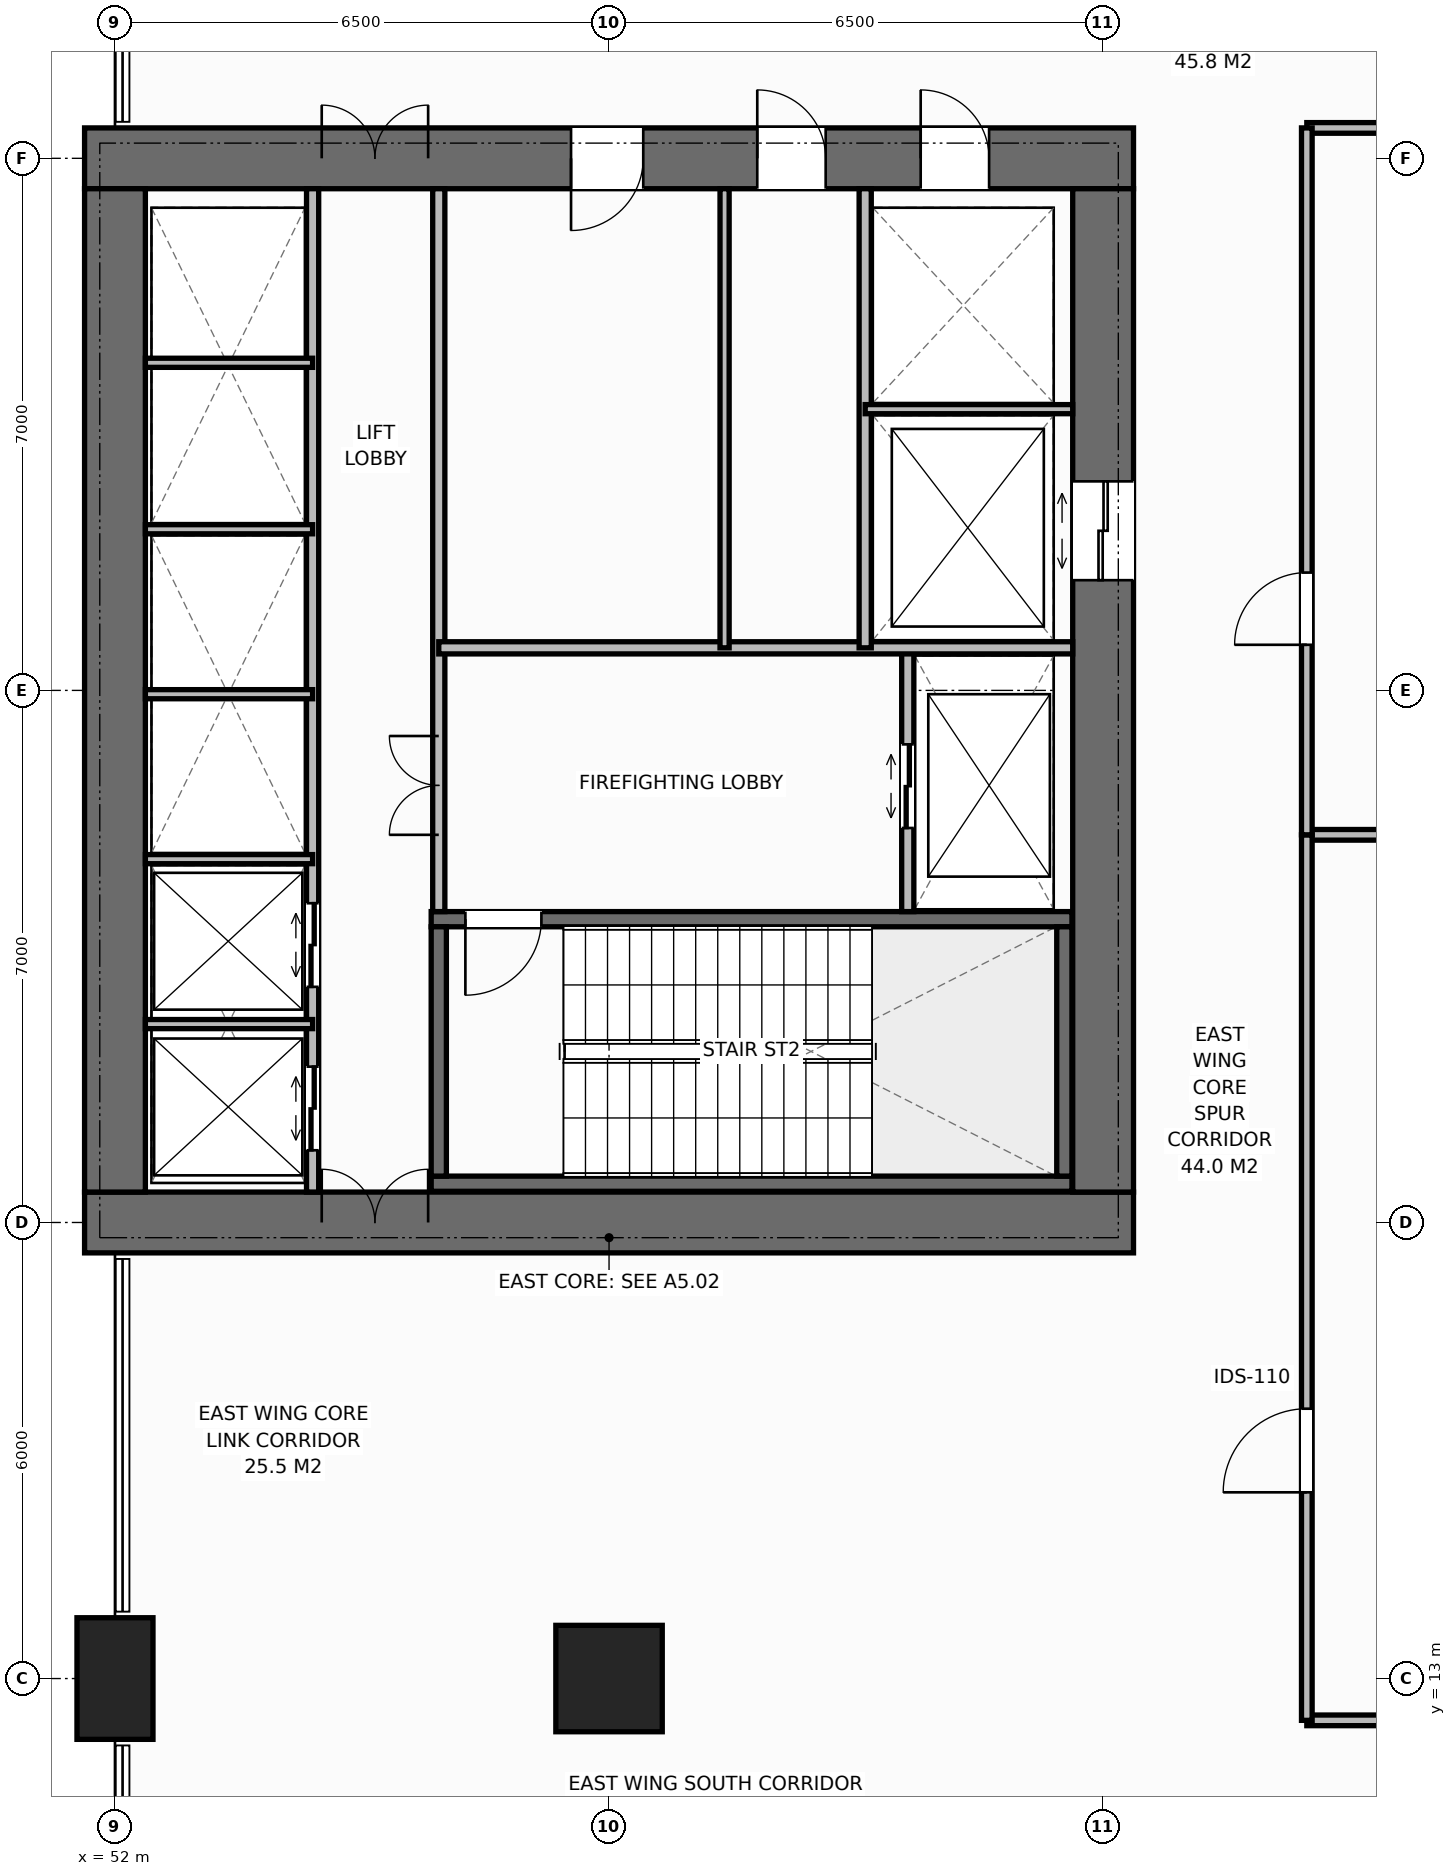
"""IFC4 building model, lengths in metres.
Left out: names, types, materials, properties, quantities, classifications, styles, units other than length and angle.
Written with IfcOpenShell. Run it as: python <this file> out.ifc"""

import sys

from ifc_helpers import new_model, si_unit, direction, frame, frame_2d, origin, origin_2d, place, context, subcontext, project, spatial, rectangle, extrude, element, fill, save


model = new_model("IFC4")
c1 = context("Model", 3, precision=1e-05, world=origin(), true_north=direction((0.0, 1.0)))
c2 = subcontext(c1, "Body", "Model", "MODEL_VIEW")
j1 = project(units=[si_unit("LENGTHUNIT", "METRE"), si_unit("PLANEANGLEUNIT", "RADIAN")], contexts=[c1])
p1 = place(None, origin())
s1 = spatial("IfcSite", under=j1, at=p1, CompositionType="ELEMENT")
p2 = place(p1, origin())
s2 = spatial("IfcBuilding", under=s1, at=p2, CompositionType="ELEMENT")
p3 = place(p2, frame((0.0, 0.0, 17.0)))
s3 = spatial("IfcBuildingStorey", under=s2, at=p3, CompositionType="ELEMENT", Elevation=17.0)
p4 = place(p3, frame((51.6, 19.0, 0.0), z_axis=(0.0, 0.0, 1.0), x_axis=(1.0, 0.0, 0.0)))
e1 = element("IfcWall", 1, at=p4, inside=s3, PredefinedType="SHEAR", context=c2, shape_type="SweptSolid", body=[
    extrude(rectangle(XDim=13.8, YDim=0.8, at=frame_2d((6.9, 0.0))), origin(), (0.0, 0.0, 1.0), 5.0),
])
p5 = place(p4, frame((3.12, 0.0, 0.0)))
e2 = element("IfcOpeningElement", 2, at=p5, cuts=e1, PredefinedType="OPENING", context=c2, shape_type="SweptSolid", body=[
    extrude(rectangle(XDim=1.4, YDim=2.2, at=frame_2d((0.7, 1.1))), frame((0.0, 0.41, 0.0), z_axis=(0.0, -1.0, 0.0), x_axis=(1.0, 0.0, 0.0)), (0.0, 0.0, 1.0), 0.82),
])
p6 = place(p3, frame((51.6, 33.0, 0.0), z_axis=(0.0, 0.0, 1.0), x_axis=(1.0, 0.0, 0.0)))
e3 = element("IfcWall", 3, at=p6, inside=s3, PredefinedType="SHEAR", context=c2, shape_type="SweptSolid", body=[
    extrude(rectangle(XDim=13.8, YDim=0.8, at=frame_2d((6.9, 0.0))), origin(), (0.0, 0.0, 1.0), 5.0),
])
p7 = place(p6, frame((3.12, 0.0, 0.0)))
e4 = element("IfcOpeningElement", 4, at=p7, cuts=e3, PredefinedType="OPENING", context=c2, shape_type="SweptSolid", body=[
    extrude(rectangle(XDim=1.4, YDim=2.2, at=frame_2d((0.7, 1.1))), frame((0.0, 0.41, 0.0), z_axis=(0.0, -1.0, 0.0), x_axis=(1.0, 0.0, 0.0)), (0.0, 0.0, 1.0), 0.82),
])
p8 = place(p6, frame((11.0, 0.0, 0.0)))
e5 = element("IfcOpeningElement", 5, at=p8, cuts=e3, PredefinedType="OPENING", context=c2, shape_type="SweptSolid", body=[
    extrude(rectangle(XDim=0.9, YDim=2.15, at=frame_2d((0.45, 1.075))), frame((0.0, 0.41, 0.0), z_axis=(0.0, -1.0, 0.0), x_axis=(1.0, 0.0, 0.0)), (0.0, 0.0, 1.0), 0.82),
])
p9 = place(p6, frame((6.4, 0.0, 0.0)))
e6 = element("IfcOpeningElement", 6, at=p9, cuts=e3, PredefinedType="OPENING", context=c2, shape_type="SweptSolid", body=[
    extrude(rectangle(XDim=0.95, YDim=2.15, at=frame_2d((0.475, 1.075))), frame((0.0, 0.41, 0.0), z_axis=(0.0, -1.0, 0.0), x_axis=(1.0, 0.0, 0.0)), (0.0, 0.0, 1.0), 0.82),
])
p10 = place(p6, frame((8.85, 0.0, 0.0)))
e7 = element("IfcOpeningElement", 7, at=p10, cuts=e3, PredefinedType="OPENING", context=c2, shape_type="SweptSolid", body=[
    extrude(rectangle(XDim=0.9, YDim=2.15, at=frame_2d((0.45, 1.075))), frame((0.0, 0.41, 0.0), z_axis=(0.0, -1.0, 0.0), x_axis=(1.0, 0.0, 0.0)), (0.0, 0.0, 1.0), 0.82),
])
p11 = place(p3, frame((52.0, 19.4, 0.0), z_axis=(0.0, 0.0, 1.0), x_axis=(0.0, 1.0, 0.0)))
e8 = element("IfcWall", 8, at=p11, inside=s3, PredefinedType="SHEAR", context=c2, shape_type="SweptSolid", body=[
    extrude(rectangle(XDim=13.2, YDim=0.8, at=frame_2d((6.6, 0.0))), origin(), (0.0, 0.0, 1.0), 5.0),
])
p12 = place(p3, frame((65.0, 19.4, 0.0), z_axis=(0.0, 0.0, 1.0), x_axis=(0.0, 1.0, 0.0)))
e9 = element("IfcWall", 9, at=p12, inside=s3, PredefinedType="SHEAR", context=c2, shape_type="SweptSolid", body=[
    extrude(rectangle(XDim=13.2, YDim=0.8, at=frame_2d((6.6, 0.0))), origin(), (0.0, 0.0, 1.0), 5.0),
])
p13 = place(p12, frame((8.05, 0.0, 0.0)))
e10 = element("IfcOpeningElement", 10, at=p13, cuts=e9, PredefinedType="OPENING", context=c2, shape_type="SweptSolid", body=[
    extrude(rectangle(XDim=1.3, YDim=2.2, at=frame_2d((0.65, 1.1))), frame((0.0, 0.41, 0.0), z_axis=(0.0, -1.0, 0.0), x_axis=(1.0, 0.0, 0.0)), (0.0, 0.0, 1.0), 0.82),
])
p14 = place(p3, frame((56.16, 19.51, 0.0), z_axis=(0.0, 0.0, 1.0), x_axis=(1.0, 0.0, 0.0)))
e11 = element("IfcWall", 11, at=p14, inside=s3, PredefinedType="SHEAR", context=c2, shape_type="SweptSolid", body=[
    extrude(rectangle(XDim=8.43, YDim=0.2, at=frame_2d((4.215, 0.0))), origin(), (0.0, 0.0, 1.0), 5.0),
])
p15 = place(p3, frame((56.16, 22.99, 0.0), z_axis=(0.0, 0.0, 1.0), x_axis=(1.0, 0.0, 0.0)))
e12 = element("IfcWall", 12, at=p15, inside=s3, PredefinedType="SHEAR", context=c2, shape_type="SweptSolid", body=[
    extrude(rectangle(XDim=8.43, YDim=0.2, at=frame_2d((4.215, 0.0))), origin(), (0.0, 0.0, 1.0), 5.0),
])
p16 = place(p15, frame((0.45, 0.0, 0.0)))
e13 = element("IfcOpeningElement", 13, at=p16, cuts=e12, PredefinedType="OPENING", context=c2, shape_type="SweptSolid", body=[
    extrude(rectangle(XDim=1.0, YDim=2.15, at=frame_2d((0.5, 1.075))), frame((0.0, 0.11, 0.0), z_axis=(0.0, -1.0, 0.0), x_axis=(1.0, 0.0, 0.0)), (0.0, 0.0, 1.0), 0.22),
])
for number, where, z_axis, x_axis in (
    (14, (56.26, 19.61, 0.0), (0.0, 0.0, 1.0), (0.0, 1.0, 0.0)),
    (15, (64.49, 19.61, 0.0), (0.0, 0.0, 1.0), (0.0, 1.0, 0.0)),
):
    element("IfcWall", number, at=place(p3, frame(where, z_axis=z_axis, x_axis=x_axis)), inside=s3, PredefinedType="SHEAR", context=c2, shape_type="SweptSolid", body=[
        extrude(rectangle(XDim=3.28, YDim=0.2, at=frame_2d((1.64, 0.0))), origin(), (0.0, 0.0, 1.0), 5.0),
    ])
p17 = place(p3, frame((58.5, 13.0, 0.0), z_axis=(0.0, 0.0, 1.0), x_axis=(1.0, 0.0, 0.0)))
e16 = element("IfcColumn", 16, at=p17, inside=s3, PredefinedType="COLUMN", context=c2, shape_type="SweptSolid", body=[
    extrude(rectangle(XDim=1.4, YDim=1.4, at=origin_2d()), origin(), (0.0, 0.0, 1.0), 5.0),
])
p18 = place(p3, frame((52.0, 13.0, 0.0), z_axis=(0.0, 0.0, 1.0), x_axis=(1.0, 0.0, 0.0)))
e17 = element("IfcColumn", 17, at=p18, inside=s3, PredefinedType="PILASTER", context=c2, shape_type="SweptSolid", body=[
    extrude(rectangle(XDim=1.0, YDim=1.6, at=origin_2d()), origin(), (0.0, 0.0, 1.0), 5.0),
])
p19 = place(p3, frame((54.6, 19.4, 0.0), z_axis=(0.0, 0.0, 1.0), x_axis=(0.0, 1.0, 0.0)))
e18 = element("IfcWall", 18, at=p19, inside=s3, PredefinedType="STANDARD", context=c2, shape_type="SweptSolid", body=[
    extrude(rectangle(XDim=13.2, YDim=0.16, at=frame_2d((6.6, 0.0))), origin(), (0.0, 0.0, 1.0), 4.4),
])
p20 = place(p19, frame((0.55, 0.0, 0.0)))
e19 = element("IfcOpeningElement", 19, at=p20, cuts=e18, PredefinedType="OPENING", context=c2, shape_type="SweptSolid", body=[
    extrude(rectangle(XDim=1.1, YDim=2.2, at=frame_2d((0.55, 1.1))), frame((0.0, 0.09, 0.0), z_axis=(0.0, -1.0, 0.0), x_axis=(1.0, 0.0, 0.0)), (0.0, 0.0, 1.0), 0.18),
])
p21 = place(p19, frame((2.7, 0.0, 0.0)))
e20 = element("IfcOpeningElement", 20, at=p21, cuts=e18, PredefinedType="OPENING", context=c2, shape_type="SweptSolid", body=[
    extrude(rectangle(XDim=1.1, YDim=2.2, at=frame_2d((0.55, 1.1))), frame((0.0, 0.09, 0.0), z_axis=(0.0, -1.0, 0.0), x_axis=(1.0, 0.0, 0.0)), (0.0, 0.0, 1.0), 0.18),
])
p22 = place(p3, frame((56.26, 23.09, 0.0), z_axis=(0.0, 0.0, 1.0), x_axis=(0.0, 1.0, 0.0)))
e21 = element("IfcWall", 21, at=p22, inside=s3, PredefinedType="STANDARD", context=c2, shape_type="SweptSolid", body=[
    extrude(rectangle(XDim=9.51, YDim=0.16, at=frame_2d((4.755, 0.0))), origin(), (0.0, 0.0, 1.0), 4.4),
])
p23 = place(p22, frame((1.01, 0.0, 0.0)))
e22 = element("IfcOpeningElement", 22, at=p23, cuts=e21, PredefinedType="OPENING", context=c2, shape_type="SweptSolid", body=[
    extrude(rectangle(XDim=1.3, YDim=2.2, at=frame_2d((0.65, 1.1))), frame((0.0, 0.09, 0.0), z_axis=(0.0, -1.0, 0.0), x_axis=(1.0, 0.0, 0.0)), (0.0, 0.0, 1.0), 0.18),
])
for number, where, z_axis, x_axis in (
    (23, (52.4, 21.61, 0.0), (0.0, 0.0, 1.0), (1.0, 0.0, 0.0)),
    (24, (52.4, 23.78, 0.0), (0.0, 0.0, 1.0), (1.0, 0.0, 0.0)),
    (25, (52.4, 25.95, 0.0), (0.0, 0.0, 1.0), (1.0, 0.0, 0.0)),
    (26, (52.4, 28.12, 0.0), (0.0, 0.0, 1.0), (1.0, 0.0, 0.0)),
    (27, (52.4, 30.31, 0.0), (0.0, 0.0, 1.0), (1.0, 0.0, 0.0)),
):
    element("IfcWall", number, at=place(p3, frame(where, z_axis=z_axis, x_axis=x_axis)), inside=s3, PredefinedType="PARTITIONING", context=c2, shape_type="SweptSolid", body=[
        extrude(rectangle(XDim=2.2, YDim=0.12, at=frame_2d((1.1, 0.0))), origin(), (0.0, 0.0, 1.0), 4.4),
    ])
p24 = place(p3, frame((62.43, 23.09, 0.0), z_axis=(0.0, 0.0, 1.0), x_axis=(0.0, 1.0, 0.0)))
e28 = element("IfcWall", 28, at=p24, inside=s3, PredefinedType="STANDARD", context=c2, shape_type="SweptSolid", body=[
    extrude(rectangle(XDim=3.47, YDim=0.16, at=frame_2d((1.735, 0.0))), origin(), (0.0, 0.0, 1.0), 4.4),
])
p25 = place(p24, frame((1.1, 0.0, 0.0)))
e29 = element("IfcOpeningElement", 29, at=p25, cuts=e28, PredefinedType="OPENING", context=c2, shape_type="SweptSolid", body=[
    extrude(rectangle(XDim=1.1, YDim=2.2, at=frame_2d((0.55, 1.1))), frame((0.0, 0.09, 0.0), z_axis=(0.0, -1.0, 0.0), x_axis=(1.0, 0.0, 0.0)), (0.0, 0.0, 1.0), 0.18),
])
p26 = place(p3, frame((56.26, 26.56, 0.0), z_axis=(0.0, 0.0, 1.0), x_axis=(1.0, 0.0, 0.0)))
e30 = element("IfcWall", 30, at=p26, inside=s3, PredefinedType="STANDARD", context=c2, shape_type="SweptSolid", body=[
    extrude(rectangle(XDim=8.34, YDim=0.16, at=frame_2d((4.17, 0.0))), origin(), (0.0, 0.0, 1.0), 4.4),
])
p27 = place(p3, frame((61.87, 26.56, 0.0), z_axis=(0.0, 0.0, 1.0), x_axis=(0.0, 1.0, 0.0)))
e31 = element("IfcWall", 31, at=p27, inside=s3, PredefinedType="STANDARD", context=c2, shape_type="SweptSolid", body=[
    extrude(rectangle(XDim=6.04, YDim=0.16, at=frame_2d((3.02, 0.0))), origin(), (0.0, 0.0, 1.0), 4.4),
])
p28 = place(p3, frame((61.87, 29.7, 0.0), z_axis=(0.0, 0.0, 1.0), x_axis=(1.0, 0.0, 0.0)))
e32 = element("IfcWall", 32, at=p28, inside=s3, PredefinedType="PARTITIONING", context=c2, shape_type="SweptSolid", body=[
    extrude(rectangle(XDim=2.73, YDim=0.12, at=frame_2d((1.365, 0.0))), origin(), (0.0, 0.0, 1.0), 4.4),
])
p29 = place(p3, frame((60.02, 26.56, 0.0), z_axis=(0.0, 0.0, 1.0), x_axis=(0.0, 1.0, 0.0)))
e33 = element("IfcWall", 33, at=p29, inside=s3, PredefinedType="PARTITIONING", context=c2, shape_type="SweptSolid", body=[
    extrude(rectangle(XDim=6.04, YDim=0.12, at=frame_2d((3.02, 0.0))), origin(), (0.0, 0.0, 1.0), 4.4),
])
for number, where, z_axis, x_axis in (
    (34, (67.68, 24.1, 0.0), (0.0, 0.0, 1.0), (1.0, 0.0, 0.0)),
    (35, (67.68, 33.4, 0.0), (0.0, 0.0, 1.0), (1.0, 0.0, 0.0)),
):
    element("IfcWall", number, at=place(p3, frame(where, z_axis=z_axis, x_axis=x_axis)), inside=s3, PredefinedType="PARTITIONING", context=c2, shape_type="SweptSolid", body=[
        extrude(rectangle(XDim=10.32, YDim=0.14, at=frame_2d((5.16, 0.0))), origin(), (0.0, 0.0, 1.0), 4.4),
    ])
p30 = place(p3, frame((67.68, 12.45, 0.0), z_axis=(0.0, 0.0, 1.0), x_axis=(1.0, 0.0, 0.0)))
e36 = element("IfcWall", 36, at=p30, inside=s3, PredefinedType="PARTITIONING", context=c2, shape_type="SweptSolid", body=[
    extrude(rectangle(XDim=6.27, YDim=0.14, at=frame_2d((3.135, 0.0))), origin(), (0.0, 0.0, 1.0), 4.4),
])
p31 = place(p3, frame((67.68, 12.45, 0.0), z_axis=(0.0, 0.0, 1.0), x_axis=(0.0, 1.0, 0.0)))
e37 = element("IfcWall", 37, at=p31, inside=s3, PredefinedType="PARTITIONING", context=c2, shape_type="SweptSolid", body=[
    extrude(rectangle(XDim=11.65, YDim=0.14, at=frame_2d((5.825, 0.0))), origin(), (0.0, 0.0, 1.0), 4.4),
])
p32 = place(p31, frame((3.0, 0.0, 0.0)))
e38 = element("IfcOpeningElement", 38, at=p32, cuts=e37, PredefinedType="OPENING", context=c2, shape_type="SweptSolid", body=[
    extrude(rectangle(XDim=1.1, YDim=2.15, at=frame_2d((0.55, 1.075))), frame((0.0, 0.08, 0.0), z_axis=(0.0, -1.0, 0.0), x_axis=(1.0, 0.0, 0.0)), (0.0, 0.0, 1.0), 0.16),
])
p33 = place(p3, frame((67.68, 24.1, 0.0), z_axis=(0.0, 0.0, 1.0), x_axis=(0.0, 1.0, 0.0)))
e39 = element("IfcWall", 39, at=p33, inside=s3, PredefinedType="PARTITIONING", context=c2, shape_type="SweptSolid", body=[
    extrude(rectangle(XDim=9.3, YDim=0.14, at=frame_2d((4.65, 0.0))), origin(), (0.0, 0.0, 1.0), 4.4),
])
p34 = place(p33, frame((2.5, 0.0, 0.0)))
e40 = element("IfcOpeningElement", 40, at=p34, cuts=e39, PredefinedType="OPENING", context=c2, shape_type="SweptSolid", body=[
    extrude(rectangle(XDim=0.95, YDim=2.15, at=frame_2d((0.475, 1.075))), frame((0.0, 0.08, 0.0), z_axis=(0.0, -1.0, 0.0), x_axis=(1.0, 0.0, 0.0)), (0.0, 0.0, 1.0), 0.16),
])
p35 = place(p5, origin())
e41 = element("IfcDoor", 41, at=p35, inside=s3, OperationType="DOUBLE_DOOR_SINGLE_SWING", PredefinedType="DOOR", context=c2, shape_type="SweptSolid", body=[
    extrude(rectangle(XDim=1.4, YDim=2.2, at=frame_2d((0.7, 1.1))), frame((0.0, 0.125, 0.0), z_axis=(0.0, -1.0, 0.0), x_axis=(1.0, 0.0, 0.0)), (0.0, 0.0, 1.0), 0.05),
])
fill(e2, e41)
p36 = place(p7, origin())
e42 = element("IfcDoor", 42, at=p36, inside=s3, OperationType="DOUBLE_DOOR_SINGLE_SWING", PredefinedType="DOOR", context=c2, shape_type="SweptSolid", body=[
    extrude(rectangle(XDim=1.4, YDim=2.2, at=frame_2d((0.7, 1.1))), frame((0.0, -0.075, 0.0), z_axis=(0.0, -1.0, 0.0), x_axis=(1.0, 0.0, 0.0)), (0.0, 0.0, 1.0), 0.05),
])
fill(e4, e42)
p37 = place(p20, origin())
e43 = element("IfcDoor", 43, at=p37, inside=s3, OperationType="DOUBLE_DOOR_SLIDING", PredefinedType="DOOR", context=c2, shape_type="SweptSolid", body=[
    extrude(rectangle(XDim=1.1, YDim=2.2, at=frame_2d((0.55, 1.1))), frame((0.0, 0.025, 0.0), z_axis=(0.0, -1.0, 0.0), x_axis=(1.0, 0.0, 0.0)), (0.0, 0.0, 1.0), 0.05),
])
fill(e19, e43)
p38 = place(p21, origin())
e44 = element("IfcDoor", 44, at=p38, inside=s3, OperationType="DOUBLE_DOOR_SLIDING", PredefinedType="DOOR", context=c2, shape_type="SweptSolid", body=[
    extrude(rectangle(XDim=1.1, YDim=2.2, at=frame_2d((0.55, 1.1))), frame((0.0, 0.025, 0.0), z_axis=(0.0, -1.0, 0.0), x_axis=(1.0, 0.0, 0.0)), (0.0, 0.0, 1.0), 0.05),
])
fill(e20, e44)
p39 = place(p16, origin())
e45 = element("IfcDoor", 45, at=p39, inside=s3, OperationType="SINGLE_SWING_RIGHT", PredefinedType="DOOR", context=c2, shape_type="SweptSolid", body=[
    extrude(rectangle(XDim=1.0, YDim=2.15, at=frame_2d((0.5, 1.075))), frame((0.0, 0.025, 0.0), z_axis=(0.0, -1.0, 0.0), x_axis=(1.0, 0.0, 0.0)), (0.0, 0.0, 1.0), 0.05),
])
fill(e13, e45)
p40 = place(p25, origin())
e46 = element("IfcDoor", 46, at=p40, inside=s3, OperationType="DOUBLE_DOOR_SLIDING", PredefinedType="DOOR", context=c2, shape_type="SweptSolid", body=[
    extrude(rectangle(XDim=1.1, YDim=2.2, at=frame_2d((0.55, 1.1))), frame((0.0, 0.025, 0.0), z_axis=(0.0, -1.0, 0.0), x_axis=(1.0, 0.0, 0.0)), (0.0, 0.0, 1.0), 0.05),
])
fill(e29, e46)
p41 = place(p23, origin())
e47 = element("IfcDoor", 47, at=p41, inside=s3, OperationType="DOUBLE_DOOR_SINGLE_SWING", PredefinedType="DOOR", context=c2, shape_type="SweptSolid", body=[
    extrude(rectangle(XDim=1.3, YDim=2.2, at=frame_2d((0.65, 1.1))), frame((0.0, 0.025, 0.0), z_axis=(0.0, -1.0, 0.0), x_axis=(1.0, 0.0, 0.0)), (0.0, 0.0, 1.0), 0.05),
])
fill(e22, e47)
p42 = place(p13, origin())
e48 = element("IfcDoor", 48, at=p42, inside=s3, OperationType="DOUBLE_DOOR_SLIDING", PredefinedType="DOOR", context=c2, shape_type="SweptSolid", body=[
    extrude(rectangle(XDim=1.3, YDim=2.2, at=frame_2d((0.65, 1.1))), frame((0.0, 0.025, 0.0), z_axis=(0.0, -1.0, 0.0), x_axis=(1.0, 0.0, 0.0)), (0.0, 0.0, 1.0), 0.05),
])
fill(e10, e48)
p43 = place(p8, origin())
e49 = element("IfcDoor", 49, at=p43, inside=s3, OperationType="SINGLE_SWING_LEFT", PredefinedType="DOOR", context=c2, shape_type="SweptSolid", body=[
    extrude(rectangle(XDim=0.9, YDim=2.15, at=frame_2d((0.45, 1.075))), frame((0.0, -0.075, 0.0), z_axis=(0.0, -1.0, 0.0), x_axis=(1.0, 0.0, 0.0)), (0.0, 0.0, 1.0), 0.05),
])
fill(e5, e49)
p44 = place(p9, origin())
e50 = element("IfcDoor", 50, at=p44, inside=s3, OperationType="SINGLE_SWING_RIGHT", PredefinedType="DOOR", context=c2, shape_type="SweptSolid", body=[
    extrude(rectangle(XDim=0.95, YDim=2.15, at=frame_2d((0.475, 1.075))), frame((0.0, -0.075, 0.0), z_axis=(0.0, -1.0, 0.0), x_axis=(1.0, 0.0, 0.0)), (0.0, 0.0, 1.0), 0.05),
])
fill(e6, e50)
p45 = place(p10, origin())
e51 = element("IfcDoor", 51, at=p45, inside=s3, OperationType="SINGLE_SWING_LEFT", PredefinedType="DOOR", context=c2, shape_type="SweptSolid", body=[
    extrude(rectangle(XDim=0.9, YDim=2.15, at=frame_2d((0.45, 1.075))), frame((0.0, -0.075, 0.0), z_axis=(0.0, -1.0, 0.0), x_axis=(1.0, 0.0, 0.0)), (0.0, 0.0, 1.0), 0.05),
])
fill(e7, e51)
p46 = place(p32, origin())
e52 = element("IfcDoor", 52, at=p46, inside=s3, OperationType="SINGLE_SWING_LEFT", PredefinedType="DOOR", context=c2, shape_type="SweptSolid", body=[
    extrude(rectangle(XDim=1.1, YDim=2.15, at=frame_2d((0.55, 1.075))), frame((0.0, 0.025, 0.0), z_axis=(0.0, -1.0, 0.0), x_axis=(1.0, 0.0, 0.0)), (0.0, 0.0, 1.0), 0.05),
])
fill(e38, e52)
p47 = place(p34, origin())
e53 = element("IfcDoor", 53, at=p47, inside=s3, OperationType="SINGLE_SWING_LEFT", PredefinedType="DOOR", context=c2, shape_type="SweptSolid", body=[
    extrude(rectangle(XDim=0.95, YDim=2.15, at=frame_2d((0.475, 1.075))), frame((0.0, 0.025, 0.0), z_axis=(0.0, -1.0, 0.0), x_axis=(1.0, 0.0, 0.0)), (0.0, 0.0, 1.0), 0.05),
])
fill(e40, e53)
save(model, sys.argv[1])
